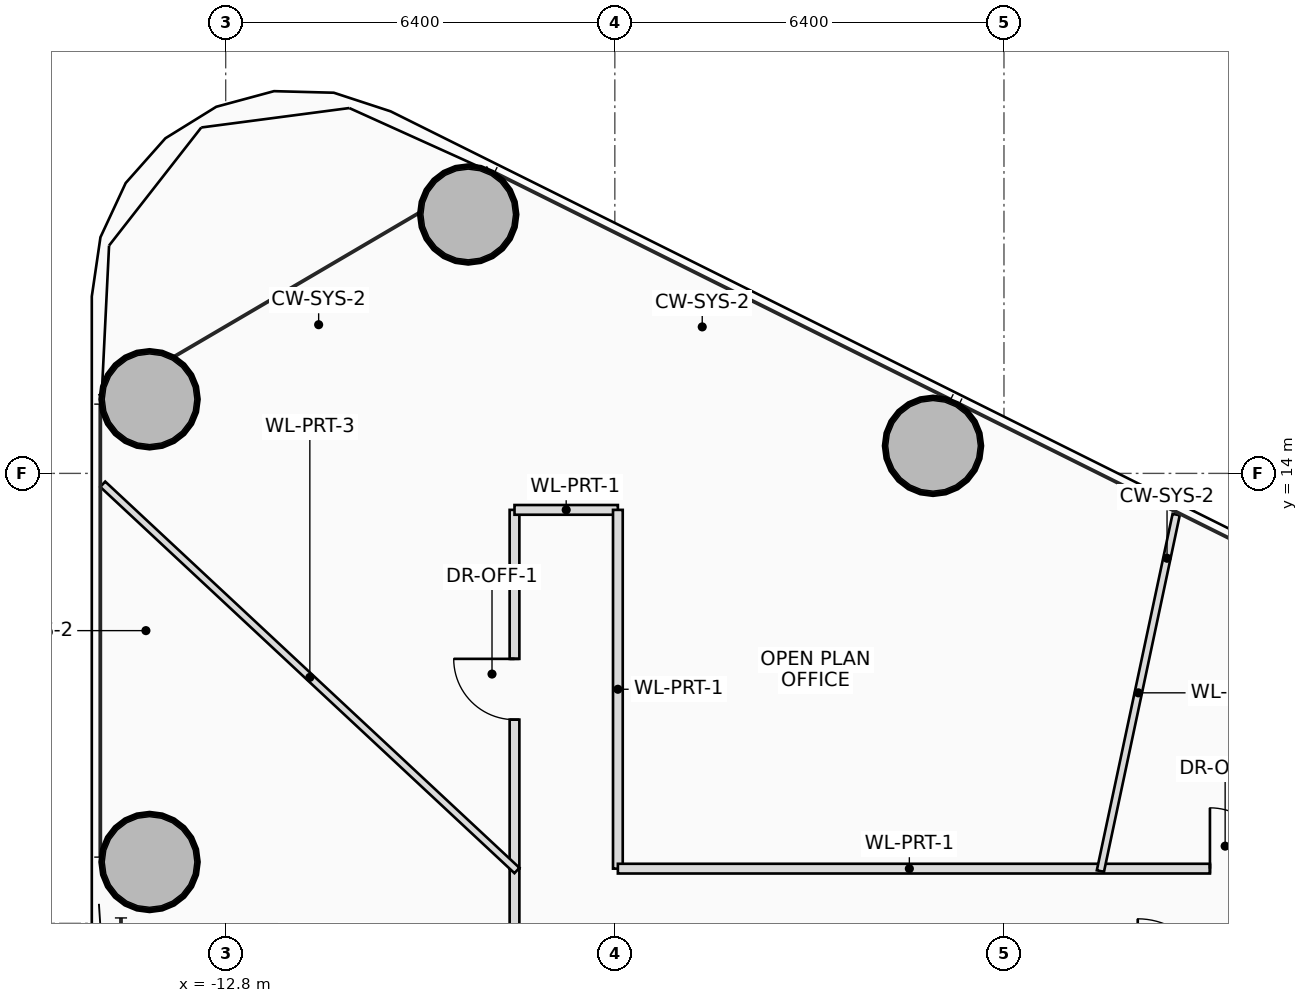
"""IFC4 building model, lengths in metres.
Left out: names, types, materials, properties, quantities, classifications, styles, units other than length and angle.
Written with IfcOpenShell. Run it as: python <this file> out.ifc"""

import sys

from ifc_helpers import new_model, si_unit, direction, frame, frame_2d, origin, origin_2d, place, context, subcontext, project, spatial, rectangle, hollow_circle, extrude, source, transform, mapped, element, fill, save


model = new_model("IFC4")
c1 = context("Model", 3, precision=1e-05, world=origin(), true_north=direction((0.0, 1.0)))
c2 = subcontext(c1, "Body", "Model", "MODEL_VIEW")
j1 = project(units=[si_unit("LENGTHUNIT", "METRE"), si_unit("PLANEANGLEUNIT", "RADIAN")], contexts=[c1])
p1 = place(None, origin())
s1 = spatial("IfcSite", under=j1, at=p1, CompositionType="ELEMENT")
p2 = place(p1, origin())
s2 = spatial("IfcBuilding", under=s1, at=p2, CompositionType="ELEMENT")
p3 = place(p2, frame((0.0, 0.0, 23.8)))
s3 = spatial("IfcBuildingStorey", under=s2, at=p3, CompositionType="ELEMENT", Elevation=23.8)
m1 = source(origin(), c2, "Body", "SweptSolid", [
    extrude(hollow_circle(Radius=0.8, WallThickness=0.055, at=origin_2d()), origin(), (0.0, 0.0, 1.0), 3.7),
])
for number, where, z_axis, x_axis in (
    (1, (-1.167, 14.453, 0.0), (0.0, 0.0, 1.0), (1.0, 0.0, 0.0)),
    (2, (-8.812, 18.258, 0.0), (0.0, 0.0, 1.0), (1.0, 0.0, 0.0)),
    (3, (-14.052, 15.219, 0.0), (0.0, 0.0, 1.0), (1.0, 0.0, 0.0)),
    (4, (-14.052, 7.61, 0.0), (0.0, 0.0, 1.0), (1.0, 0.0, 0.0)),
):
    element("IfcColumn", number, at=place(p3, frame(where, z_axis=z_axis, x_axis=x_axis)), inside=s3, PredefinedType="COLUMN", context=c2, shape_type="MappedRepresentation", body=[
        mapped(m1, transform((0.0, 0.0, 0.0), scale=1.0)),
    ])
p4 = place(p3, frame((-8.05, -7.5, 0.0), z_axis=(0.0, 0.0, 1.0), x_axis=(0.0, 1.0, 0.0)))
e5 = element("IfcWall", 5, at=p4, inside=s3, PredefinedType="PARTITIONING", context=c2, shape_type="SweptSolid", body=[
    extrude(rectangle(XDim=15.0, YDim=0.16, at=frame_2d((7.5, 0.0))), origin(), (0.0, 0.0, 1.0), 2.8),
])
p5 = place(p4, frame((7.0, 0.0, 0.0)))
e6 = element("IfcOpeningElement", 6, at=p5, cuts=e5, PredefinedType="OPENING", context=c2, shape_type="SweptSolid", body=[
    extrude(rectangle(XDim=1.0, YDim=2.25, at=frame_2d((0.5, 1.125))), frame((0.0, 0.09, 0.0), z_axis=(0.0, -1.0, 0.0), x_axis=(1.0, 0.0, 0.0)), (0.0, 0.0, 1.0), 0.18),
])
p6 = place(p3, frame((-8.05, 7.5, 0.0), z_axis=(0.0, 0.0, 1.0), x_axis=(0.0, 1.0, 0.0)))
e7 = element("IfcWall", 7, at=p6, inside=s3, PredefinedType="PARTITIONING", context=c2, shape_type="SweptSolid", body=[
    extrude(rectangle(XDim=5.9, YDim=0.16, at=frame_2d((2.95, 0.0))), origin(), (0.0, 0.0, 1.0), 2.8),
])
p7 = place(p6, frame((2.45, 0.0, 0.0)))
e8 = element("IfcOpeningElement", 8, at=p7, cuts=e7, PredefinedType="OPENING", context=c2, shape_type="SweptSolid", body=[
    extrude(rectangle(XDim=1.0, YDim=2.25, at=frame_2d((0.5, 1.125))), frame((0.0, 0.09, 0.0), z_axis=(0.0, -1.0, 0.0), x_axis=(1.0, 0.0, 0.0)), (0.0, 0.0, 1.0), 0.18),
])
p8 = place(p3, frame((-8.05, 13.4, 0.0), z_axis=(0.0, 0.0, 1.0), x_axis=(1.0, 0.0, 0.0)))
e9 = element("IfcWall", 9, at=p8, inside=s3, PredefinedType="PARTITIONING", context=c2, shape_type="SweptSolid", body=[
    extrude(rectangle(XDim=1.7, YDim=0.16, at=frame_2d((0.85, 0.0))), origin(), (0.0, 0.0, 1.0), 2.8),
])
p9 = place(p3, frame((-6.35, 13.4, 0.0), z_axis=(0.0, 0.0, 1.0), x_axis=(0.0, -1.0, 0.0)))
e10 = element("IfcWall", 10, at=p9, inside=s3, PredefinedType="PARTITIONING", context=c2, shape_type="SweptSolid", body=[
    extrude(rectangle(XDim=5.9, YDim=0.16, at=frame_2d((2.95, 0.0))), origin(), (0.0, 0.0, 1.0), 2.8),
])
p10 = place(p3, frame((-6.35, 7.5, 0.0), z_axis=(0.0, 0.0, 1.0), x_axis=(1.0, 0.0, 0.0)))
e11 = element("IfcWall", 11, at=p10, inside=s3, PredefinedType="PARTITIONING", context=c2, shape_type="SweptSolid", body=[
    extrude(rectangle(XDim=12.7, YDim=0.16, at=frame_2d((6.35, 0.0))), origin(), (0.0, 0.0, 1.0), 2.8),
])
p11 = place(p10, frame((9.737, 0.0, 0.0)))
e12 = element("IfcOpeningElement", 12, at=p11, cuts=e11, PredefinedType="OPENING", context=c2, shape_type="SweptSolid", body=[
    extrude(rectangle(XDim=1.0, YDim=2.25, at=frame_2d((0.5, 1.125))), frame((0.0, 0.09, 0.0), z_axis=(0.0, -1.0, 0.0), x_axis=(1.0, 0.0, 0.0)), (0.0, 0.0, 1.0), 0.18),
])
p12 = place(p3, frame((1.586, 7.46, 0.0), z_axis=(0.0, 0.0, 1.0), x_axis=(0.207898702609, 0.978150361373, 0.0)))
e13 = element("IfcWall", 13, at=p12, inside=s3, PredefinedType="PARTITIONING", context=c2, shape_type="SweptSolid", body=[
    extrude(rectangle(XDim=5.994, YDim=0.12, at=frame_2d((2.997, 0.0))), origin(), (0.0, 0.0, 1.0), 2.96),
])
p13 = place(p3, frame((-8.01, 7.469, 0.0), z_axis=(0.0, 0.0, 1.0), x_axis=(-0.731354171407, 0.681997856277, 0.0)))
e14 = element("IfcWall", 14, at=p13, inside=s3, PredefinedType="PARTITIONING", context=c2, shape_type="SweptSolid", body=[
    extrude(rectangle(XDim=9.314, YDim=0.12, at=frame_2d((4.657, 0.0))), origin(), (0.0, 0.0, 1.0), 2.96),
])
p14 = place(p7, origin())
e15 = element("IfcDoor", 15, at=p14, inside=s3, OperationType="SINGLE_SWING_RIGHT", PredefinedType="DOOR", context=c2, shape_type="SweptSolid", body=[
    extrude(rectangle(XDim=1.0, YDim=2.25, at=frame_2d((0.5, 1.125))), frame((0.0, 0.025, 0.0), z_axis=(0.0, -1.0, 0.0), x_axis=(1.0, 0.0, 0.0)), (0.0, 0.0, 1.0), 0.05),
])
fill(e8, e15)
p15 = place(p11, origin())
e16 = element("IfcDoor", 16, at=p15, inside=s3, OperationType="SINGLE_SWING_LEFT", PredefinedType="DOOR", context=c2, shape_type="SweptSolid", body=[
    extrude(rectangle(XDim=1.0, YDim=2.25, at=frame_2d((0.5, 1.125))), frame((0.0, 0.025, 0.0), z_axis=(0.0, -1.0, 0.0), x_axis=(1.0, 0.0, 0.0)), (0.0, 0.0, 1.0), 0.05),
])
fill(e12, e16)
save(model, sys.argv[1])
